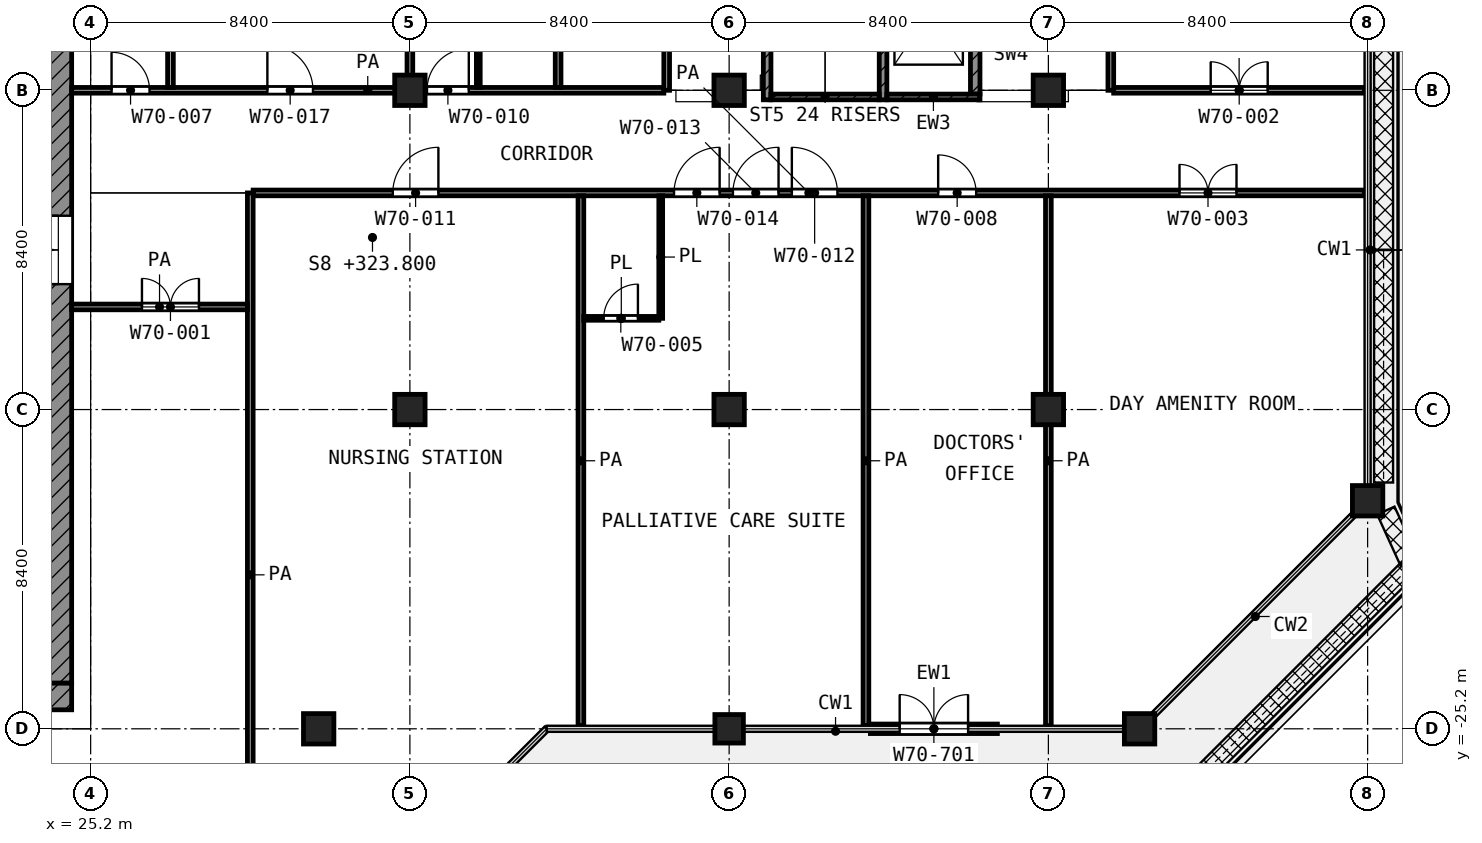
"""IFC4 building model, lengths in metres.
Left out: names, types, materials, properties, quantities, classifications, styles, units other than length and angle.
Written with IfcOpenShell. Run it as: python <this file> out.ifc"""

import sys

from ifc_helpers import new_model, si_unit, direction, frame, frame_2d, origin, origin_2d, place, context, subcontext, project, spatial, rectangle, extrude, element, fill, save


model = new_model("IFC4")
c1 = context("Model", 3, precision=1e-05, world=origin(), true_north=direction((0.0, 1.0)))
c2 = subcontext(c1, "Body", "Model", "MODEL_VIEW")
j1 = project(units=[si_unit("LENGTHUNIT", "METRE"), si_unit("PLANEANGLEUNIT", "RADIAN")], contexts=[c1])
p1 = place(None, origin())
s1 = spatial("IfcSite", under=j1, at=p1, CompositionType="ELEMENT")
p2 = place(p1, origin())
s2 = spatial("IfcBuilding", under=s1, at=p2, CompositionType="ELEMENT")
p3 = place(p2, frame((0.0, 0.0, 323.8)))
s3 = spatial("IfcBuildingStorey", under=s2, at=p3, CompositionType="ELEMENT", Elevation=323.8)
for number, where, z_axis, x_axis in (
    (1, (33.6, -8.4, 0.0), (0.0, 0.0, 1.0), (1.0, 0.0, 0.0)),
    (2, (42.0, -8.4, 0.0), (0.0, 0.0, 1.0), (1.0, 0.0, 0.0)),
    (3, (50.4, -8.4, 0.0), (0.0, 0.0, 1.0), (1.0, 0.0, 0.0)),
    (4, (33.6, -16.8, 0.0), (0.0, 0.0, 1.0), (1.0, 0.0, 0.0)),
    (5, (42.0, -16.8, 0.0), (0.0, 0.0, 1.0), (1.0, 0.0, 0.0)),
    (6, (50.4, -16.8, 0.0), (0.0, 0.0, 1.0), (1.0, 0.0, 0.0)),
    (7, (58.8, -19.2, 0.0), (0.0, 0.0, 1.0), (1.0, 0.0, 0.0)),
    (8, (31.2, -25.2, 0.0), (0.0, 0.0, 1.0), (1.0, 0.0, 0.0)),
):
    element("IfcColumn", number, at=place(p3, frame(where, z_axis=z_axis, x_axis=x_axis)), inside=s3, PredefinedType="COLUMN", context=c2, shape_type="SweptSolid", body=[
        extrude(rectangle(XDim=0.8, YDim=0.8, at=origin_2d()), origin(), (0.0, 0.0, 1.0), 4.2),
    ])
p4 = place(p3, frame((42.0, -25.2, 0.0), z_axis=(0.0, 0.0, 1.0), x_axis=(1.0, 0.0, 0.0)))
e9 = element("IfcColumn", 9, at=p4, inside=s3, PredefinedType="COLUMN", context=c2, shape_type="SweptSolid", body=[
    extrude(rectangle(XDim=0.75, YDim=0.75, at=origin_2d()), origin(), (0.0, 0.0, 1.0), 4.2),
])
p5 = place(p3, frame((52.8, -25.2, 0.0), z_axis=(0.0, 0.0, 1.0), x_axis=(1.0, 0.0, 0.0)))
e10 = element("IfcColumn", 10, at=p5, inside=s3, PredefinedType="COLUMN", context=c2, shape_type="SweptSolid", body=[
    extrude(rectangle(XDim=0.8, YDim=0.8, at=origin_2d()), origin(), (0.0, 0.0, 1.0), 4.2),
])
p6 = place(p3, frame((45.717, -25.2, 0.0), z_axis=(0.0, 0.0, 1.0), x_axis=(1.0, 0.0, 0.0)))
e11 = element("IfcWall", 11, at=p6, inside=s3, PredefinedType="SOLIDWALL", context=c2, shape_type="SweptSolid", body=[
    extrude(rectangle(XDim=3.342, YDim=0.25, at=frame_2d((1.671, 0.0))), origin(), (0.0, 0.0, 1.0), 3.48),
])
p7 = place(p6, frame((0.771, 0.0, 0.0)))
e12 = element("IfcOpeningElement", 12, at=p7, cuts=e11, PredefinedType="OPENING", context=c2, shape_type="SweptSolid", body=[
    extrude(rectangle(XDim=1.8, YDim=2.1, at=frame_2d((0.9, 1.05))), frame((0.0, 0.135, 0.0), z_axis=(0.0, -1.0, 0.0), x_axis=(1.0, 0.0, 0.0)), (0.0, 0.0, 1.0), 0.27),
])
p8 = place(p3, frame((24.35, -24.0, 0.0), z_axis=(0.0, 0.0, 1.0), x_axis=(0.0, 1.0, 0.0)))
e13 = element("IfcWall", 13, at=p8, inside=s3, PredefinedType="SHEAR", context=c2, shape_type="SweptSolid", body=[
    extrude(rectangle(XDim=18.6, YDim=0.7, at=frame_2d((9.3, 0.0))), origin(), (0.0, 0.0, 1.0), 3.6),
])
p9 = place(p8, frame((10.5, 0.0, 0.0)))
e14 = element("IfcOpeningElement", 14, at=p9, cuts=e13, PredefinedType="OPENING", context=c2, shape_type="SweptSolid", body=[
    extrude(rectangle(XDim=1.8, YDim=2.1, at=frame_2d((0.9, 1.05))), frame((0.0, 0.36, 0.0), z_axis=(0.0, -1.0, 0.0), x_axis=(1.0, 0.0, 0.0)), (0.0, 0.0, 1.0), 0.72),
])
p10 = place(p3, frame((24.35, -24.7, 0.0), z_axis=(0.0, 0.0, 1.0), x_axis=(0.0, 1.0, 0.0)))
e15 = element("IfcWall", 15, at=p10, inside=s3, PredefinedType="SHEAR", context=c2, shape_type="SweptSolid", body=[
    extrude(rectangle(XDim=0.7, YDim=0.7, at=frame_2d((0.35, 0.0))), origin(), (0.0, 0.0, 1.0), 3.6),
])
p11 = place(p3, frame((43.0, -8.65, 0.0), z_axis=(0.0, 0.0, 1.0), x_axis=(0.0, 1.0, 0.0)))
e16 = element("IfcWall", 16, at=p11, inside=s3, PredefinedType="SHEAR", context=c2, shape_type="SweptSolid", body=[
    extrude(rectangle(XDim=8.35, YDim=0.2, at=frame_2d((4.175, 0.0))), origin(), (0.0, 0.0, 1.0), 3.6),
])
p12 = place(p11, frame((7.0, 0.0, 0.0)))
e17 = element("IfcOpeningElement", 17, at=p12, cuts=e16, PredefinedType="OPENING", context=c2, shape_type="SweptSolid", body=[
    extrude(rectangle(XDim=1.1, YDim=2.1, at=frame_2d((0.55, 1.05))), frame((0.0, 0.11, 0.0), z_axis=(0.0, -1.0, 0.0), x_axis=(1.0, 0.0, 0.0)), (0.0, 0.0, 1.0), 0.22),
])
p13 = place(p3, frame((46.05, -8.65, 0.0), z_axis=(0.0, 0.0, 1.0), x_axis=(0.0, 1.0, 0.0)))
e18 = element("IfcWall", 18, at=p13, inside=s3, PredefinedType="SHEAR", context=c2, shape_type="SweptSolid", body=[
    extrude(rectangle(XDim=8.35, YDim=0.2, at=frame_2d((4.175, 0.0))), origin(), (0.0, 0.0, 1.0), 3.6),
])
p14 = place(p13, frame((7.0, 0.0, 0.0)))
e19 = element("IfcOpeningElement", 19, at=p14, cuts=e18, PredefinedType="OPENING", context=c2, shape_type="SweptSolid", body=[
    extrude(rectangle(XDim=1.1, YDim=2.1, at=frame_2d((0.55, 1.05))), frame((0.0, 0.11, 0.0), z_axis=(0.0, -1.0, 0.0), x_axis=(1.0, 0.0, 0.0)), (0.0, 0.0, 1.0), 0.22),
])
p15 = place(p3, frame((43.1, -8.575, 0.0), z_axis=(0.0, 0.0, 1.0), x_axis=(1.0, 0.0, 0.0)))
e20 = element("IfcWall", 20, at=p15, inside=s3, PredefinedType="SHEAR", context=c2, shape_type="SweptSolid", body=[
    extrude(rectangle(XDim=2.85, YDim=0.15, at=frame_2d((1.425, 0.0))), origin(), (0.0, 0.0, 1.0), 3.6),
])
p16 = place(p3, frame((46.15, -8.575, 0.0), z_axis=(0.0, 0.0, 1.0), x_axis=(1.0, 0.0, 0.0)))
e21 = element("IfcWall", 21, at=p16, inside=s3, PredefinedType="SHEAR", context=c2, shape_type="SweptSolid", body=[
    extrude(rectangle(XDim=2.45, YDim=0.15, at=frame_2d((1.225, 0.0))), origin(), (0.0, 0.0, 1.0), 3.6),
])
p17 = place(p3, frame((48.475, -8.5, 0.0), z_axis=(0.0, 0.0, 1.0), x_axis=(0.0, 1.0, 0.0)))
e22 = element("IfcWall", 22, at=p17, inside=s3, PredefinedType="SHEAR", context=c2, shape_type="SweptSolid", body=[
    extrude(rectangle(XDim=3.475, YDim=0.25, at=frame_2d((1.738, 0.0))), origin(), (0.0, 0.0, 1.0), 3.6),
])
p18 = place(p3, frame((38.175, -14.4, 0.0), z_axis=(0.0, 0.0, 1.0), x_axis=(1.0, 0.0, 0.0)))
e23 = element("IfcWall", 23, at=p18, inside=s3, PredefinedType="PARTITIONING", context=c2, shape_type="SweptSolid", body=[
    extrude(rectangle(XDim=1.975, YDim=0.1, at=frame_2d((0.987, 0.0))), origin(), (0.0, 0.0, 1.0), 3.6),
])
p19 = place(p18, frame((0.525, 0.0, 0.0)))
e24 = element("IfcOpeningElement", 24, at=p19, cuts=e23, PredefinedType="OPENING", context=c2, shape_type="SweptSolid", body=[
    extrude(rectangle(XDim=0.9, YDim=2.1, at=frame_2d((0.45, 1.05))), frame((0.0, 0.06, 0.0), z_axis=(0.0, -1.0, 0.0), x_axis=(1.0, 0.0, 0.0)), (0.0, 0.0, 1.0), 0.12),
])
for number, where, z_axis, x_axis in (
    (25, (35.4, -8.325, 0.0), (0.0, 0.0, 1.0), (0.0, 1.0, 0.0)),
    (26, (40.2, -14.4, 0.0), (0.0, 0.0, 1.0), (0.0, 1.0, 0.0)),
):
    element("IfcWall", number, at=place(p3, frame(where, z_axis=z_axis, x_axis=x_axis)), inside=s3, PredefinedType="PARTITIONING", context=c2, shape_type="SweptSolid", body=[
        extrude(rectangle(XDim=3.225, YDim=0.1, at=frame_2d((1.612, 0.0))), origin(), (0.0, 0.0, 1.0), 3.6),
    ])
p20 = place(p3, frame((24.7, -14.1, 0.0), z_axis=(0.0, 0.0, 1.0), x_axis=(1.0, 0.0, 0.0)))
e27 = element("IfcWall", 27, at=p20, inside=s3, PredefinedType="PARTITIONING", context=c2, shape_type="SweptSolid", body=[
    extrude(rectangle(XDim=4.625, YDim=0.15, at=frame_2d((2.312, 0.0))), origin(), (0.0, 0.0, 1.0), 3.6),
])
p21 = place(p20, frame((1.85, 0.0, 0.0)))
e28 = element("IfcOpeningElement", 28, at=p21, cuts=e27, PredefinedType="OPENING", context=c2, shape_type="SweptSolid", body=[
    extrude(rectangle(XDim=1.5, YDim=2.1, at=frame_2d((0.75, 1.05))), frame((0.0, 0.085, 0.0), z_axis=(0.0, -1.0, 0.0), x_axis=(1.0, 0.0, 0.0)), (0.0, 0.0, 1.0), 0.17),
])
p22 = place(p3, frame((29.475, -11.1, 0.0), z_axis=(0.0, 0.0, 1.0), x_axis=(1.0, 0.0, 0.0)))
e29 = element("IfcWall", 29, at=p22, inside=s3, PredefinedType="PARTITIONING", context=c2, shape_type="SweptSolid", body=[
    extrude(rectangle(XDim=29.245, YDim=0.15, at=frame_2d((14.623, 0.0))), origin(), (0.0, 0.0, 1.0), 3.6),
])
p23 = place(p22, frame((3.675, 0.0, 0.0)))
e30 = element("IfcOpeningElement", 30, at=p23, cuts=e29, PredefinedType="OPENING", context=c2, shape_type="SweptSolid", body=[
    extrude(rectangle(XDim=1.2, YDim=2.1, at=frame_2d((0.6, 1.05))), frame((0.0, 0.085, 0.0), z_axis=(0.0, -1.0, 0.0), x_axis=(1.0, 0.0, 0.0)), (0.0, 0.0, 1.0), 0.17),
])
p24 = place(p22, frame((14.175, 0.0, 0.0)))
e31 = element("IfcOpeningElement", 31, at=p24, cuts=e29, PredefinedType="OPENING", context=c2, shape_type="SweptSolid", body=[
    extrude(rectangle(XDim=1.2, YDim=2.1, at=frame_2d((0.6, 1.05))), frame((0.0, 0.085, 0.0), z_axis=(0.0, -1.0, 0.0), x_axis=(1.0, 0.0, 0.0)), (0.0, 0.0, 1.0), 0.17),
])
p25 = place(p22, frame((12.625, 0.0, 0.0)))
e32 = element("IfcOpeningElement", 32, at=p25, cuts=e29, PredefinedType="OPENING", context=c2, shape_type="SweptSolid", body=[
    extrude(rectangle(XDim=1.2, YDim=2.1, at=frame_2d((0.6, 1.05))), frame((0.0, 0.085, 0.0), z_axis=(0.0, -1.0, 0.0), x_axis=(1.0, 0.0, 0.0)), (0.0, 0.0, 1.0), 0.17),
])
p26 = place(p22, frame((11.075, 0.0, 0.0)))
e33 = element("IfcOpeningElement", 33, at=p26, cuts=e29, PredefinedType="OPENING", context=c2, shape_type="SweptSolid", body=[
    extrude(rectangle(XDim=1.2, YDim=2.1, at=frame_2d((0.6, 1.05))), frame((0.0, 0.085, 0.0), z_axis=(0.0, -1.0, 0.0), x_axis=(1.0, 0.0, 0.0)), (0.0, 0.0, 1.0), 0.17),
])
p27 = place(p22, frame((18.025, 0.0, 0.0)))
e34 = element("IfcOpeningElement", 34, at=p27, cuts=e29, PredefinedType="OPENING", context=c2, shape_type="SweptSolid", body=[
    extrude(rectangle(XDim=1.0, YDim=2.1, at=frame_2d((0.5, 1.05))), frame((0.0, 0.085, 0.0), z_axis=(0.0, -1.0, 0.0), x_axis=(1.0, 0.0, 0.0)), (0.0, 0.0, 1.0), 0.17),
])
p28 = place(p22, frame((24.375, 0.0, 0.0)))
e35 = element("IfcOpeningElement", 35, at=p28, cuts=e29, PredefinedType="OPENING", context=c2, shape_type="SweptSolid", body=[
    extrude(rectangle(XDim=1.5, YDim=2.1, at=frame_2d((0.75, 1.05))), frame((0.0, 0.085, 0.0), z_axis=(0.0, -1.0, 0.0), x_axis=(1.0, 0.0, 0.0)), (0.0, 0.0, 1.0), 0.17),
])
p29 = place(p3, frame((24.7, -8.4, 0.0), z_axis=(0.0, 0.0, 1.0), x_axis=(1.0, 0.0, 0.0)))
e36 = element("IfcWall", 36, at=p29, inside=s3, PredefinedType="PARTITIONING", context=c2, shape_type="SweptSolid", body=[
    extrude(rectangle(XDim=15.582, YDim=0.15, at=frame_2d((7.791, 0.0))), origin(), (0.0, 0.0, 1.0), 3.6),
])
p30 = place(p29, frame((9.35, 0.0, 0.0)))
e37 = element("IfcOpeningElement", 37, at=p30, cuts=e36, PredefinedType="OPENING", context=c2, shape_type="SweptSolid", body=[
    extrude(rectangle(XDim=1.1, YDim=2.1, at=frame_2d((0.55, 1.05))), frame((0.0, 0.085, 0.0), z_axis=(0.0, -1.0, 0.0), x_axis=(1.0, 0.0, 0.0)), (0.0, 0.0, 1.0), 0.17),
])
p31 = place(p29, frame((1.05, 0.0, 0.0)))
e38 = element("IfcOpeningElement", 38, at=p31, cuts=e36, PredefinedType="OPENING", context=c2, shape_type="SweptSolid", body=[
    extrude(rectangle(XDim=1.0, YDim=2.1, at=frame_2d((0.5, 1.05))), frame((0.0, 0.085, 0.0), z_axis=(0.0, -1.0, 0.0), x_axis=(1.0, 0.0, 0.0)), (0.0, 0.0, 1.0), 0.17),
])
p32 = place(p29, frame((5.15, 0.0, 0.0)))
e39 = element("IfcOpeningElement", 39, at=p32, cuts=e36, PredefinedType="OPENING", context=c2, shape_type="SweptSolid", body=[
    extrude(rectangle(XDim=1.2, YDim=2.1, at=frame_2d((0.6, 1.05))), frame((0.0, 0.085, 0.0), z_axis=(0.0, -1.0, 0.0), x_axis=(1.0, 0.0, 0.0)), (0.0, 0.0, 1.0), 0.17),
])
p33 = place(p3, frame((52.118, -8.4, 0.0), z_axis=(0.0, 0.0, 1.0), x_axis=(1.0, 0.0, 0.0)))
e40 = element("IfcWall", 40, at=p33, inside=s3, PredefinedType="PARTITIONING", context=c2, shape_type="SweptSolid", body=[
    extrude(rectangle(XDim=6.602, YDim=0.15, at=frame_2d((3.301, 0.0))), origin(), (0.0, 0.0, 1.0), 3.6),
])
p34 = place(p33, frame((2.553, 0.0, 0.0)))
e41 = element("IfcOpeningElement", 41, at=p34, cuts=e40, PredefinedType="OPENING", context=c2, shape_type="SweptSolid", body=[
    extrude(rectangle(XDim=1.5, YDim=2.1, at=frame_2d((0.75, 1.05))), frame((0.0, 0.085, 0.0), z_axis=(0.0, -1.0, 0.0), x_axis=(1.0, 0.0, 0.0)), (0.0, 0.0, 1.0), 0.17),
])
p35 = place(p3, frame((27.3, -8.325, 0.0), z_axis=(0.0, 0.0, 1.0), x_axis=(0.0, 1.0, 0.0)))
e42 = element("IfcWall", 42, at=p35, inside=s3, PredefinedType="PARTITIONING", context=c2, shape_type="SweptSolid", body=[
    extrude(rectangle(XDim=8.245, YDim=0.15, at=frame_2d((4.123, 0.0))), origin(), (0.0, 0.0, 1.0), 3.6),
])
p36 = place(p3, frame((29.4, -31.198, 0.0), z_axis=(0.0, 0.0, 1.0), x_axis=(0.0, 1.0, 0.0)))
e43 = element("IfcWall", 43, at=p36, inside=s3, PredefinedType="PARTITIONING", context=c2, shape_type="SweptSolid", body=[
    extrude(rectangle(XDim=20.098, YDim=0.15, at=frame_2d((10.049, 0.0))), origin(), (0.0, 0.0, 1.0), 3.6),
])
for number, where, z_axis, x_axis in (
    (44, (33.6, -8.325, 0.0), (0.0, 0.0, 1.0), (0.0, 1.0, 0.0)),
    (45, (37.5, -8.325, 0.0), (0.0, 0.0, 1.0), (0.0, 1.0, 0.0)),
):
    element("IfcWall", number, at=place(p3, frame(where, z_axis=z_axis, x_axis=x_axis)), inside=s3, PredefinedType="PARTITIONING", context=c2, shape_type="SweptSolid", body=[
        extrude(rectangle(XDim=8.245, YDim=0.15, at=frame_2d((4.123, 0.0))), origin(), (0.0, 0.0, 1.0), 3.6),
    ])
p37 = place(p3, frame((38.1, -25.12, 0.0), z_axis=(0.0, 0.0, 1.0), x_axis=(0.0, 1.0, 0.0)))
e46 = element("IfcWall", 46, at=p37, inside=s3, PredefinedType="PARTITIONING", context=c2, shape_type="SweptSolid", body=[
    extrude(rectangle(XDim=13.945, YDim=0.15, at=frame_2d((6.973, 0.0))), origin(), (0.0, 0.0, 1.0), 3.6),
])
p38 = place(p3, frame((40.357, -8.4, 0.0), z_axis=(0.0, 0.0, 1.0), x_axis=(0.0, 1.0, 0.0)))
e47 = element("IfcWall", 47, at=p38, inside=s3, PredefinedType="PARTITIONING", context=c2, shape_type="SweptSolid", body=[
    extrude(rectangle(XDim=8.048, YDim=0.15, at=frame_2d((4.024, 0.0))), origin(), (0.0, 0.0, 1.0), 3.6),
])
p39 = place(p38, frame((3.574, 0.0, 0.0)))
e48 = element("IfcOpeningElement", 48, at=p39, cuts=e47, PredefinedType="OPENING", context=c2, shape_type="SweptSolid", body=[
    extrude(rectangle(XDim=0.9, YDim=2.1, at=frame_2d((0.45, 1.05))), frame((0.0, 0.085, 0.0), z_axis=(0.0, -1.0, 0.0), x_axis=(1.0, 0.0, 0.0)), (0.0, 0.0, 1.0), 0.17),
])
for number, where, z_axis, x_axis in (
    (49, (45.6, -25.12, 0.0), (0.0, 0.0, 1.0), (0.0, 1.0, 0.0)),
    (50, (50.4, -25.12, 0.0), (0.0, 0.0, 1.0), (0.0, 1.0, 0.0)),
):
    element("IfcWall", number, at=place(p3, frame(where, z_axis=z_axis, x_axis=x_axis)), inside=s3, PredefinedType="PARTITIONING", context=c2, shape_type="SweptSolid", body=[
        extrude(rectangle(XDim=13.945, YDim=0.15, at=frame_2d((6.973, 0.0))), origin(), (0.0, 0.0, 1.0), 3.6),
    ])
p40 = place(p3, frame((52.043, -8.4, 0.0), z_axis=(0.0, 0.0, 1.0), x_axis=(0.0, 1.0, 0.0)))
e51 = element("IfcWall", 51, at=p40, inside=s3, PredefinedType="PARTITIONING", context=c2, shape_type="SweptSolid", body=[
    extrude(rectangle(XDim=6.548, YDim=0.15, at=frame_2d((3.274, 0.0))), origin(), (0.0, 0.0, 1.0), 3.6),
])
p41 = place(p7, origin())
e52 = element("IfcDoor", 52, at=p41, inside=s3, OperationType="DOUBLE_DOOR_SINGLE_SWING", PredefinedType="DOOR", context=c2, shape_type="SweptSolid", body=[
    extrude(rectangle(XDim=1.8, YDim=2.1, at=frame_2d((0.9, 1.05))), frame((0.0, 0.025, 0.0), z_axis=(0.0, -1.0, 0.0), x_axis=(1.0, 0.0, 0.0)), (0.0, 0.0, 1.0), 0.05),
])
fill(e12, e52)
p42 = place(p9, origin())
e53 = element("IfcDoor", 53, at=p42, inside=s3, OperationType="DOUBLE_DOOR_SINGLE_SWING", PredefinedType="DOOR", context=c2, shape_type="SweptSolid", body=[
    extrude(rectangle(XDim=1.8, YDim=2.1, at=frame_2d((0.9, 1.05))), frame((0.0, 0.025, 0.0), z_axis=(0.0, -1.0, 0.0), x_axis=(1.0, 0.0, 0.0)), (0.0, 0.0, 1.0), 0.05),
])
fill(e14, e53)
p43 = place(p21, origin())
e54 = element("IfcDoor", 54, at=p43, inside=s3, OperationType="DOUBLE_DOOR_SINGLE_SWING", PredefinedType="DOOR", context=c2, shape_type="SweptSolid", body=[
    extrude(rectangle(XDim=1.5, YDim=2.1, at=frame_2d((0.75, 1.05))), frame((0.0, 0.025, 0.0), z_axis=(0.0, -1.0, 0.0), x_axis=(1.0, 0.0, 0.0)), (0.0, 0.0, 1.0), 0.05),
])
fill(e28, e54)
p44 = place(p30, origin())
e55 = element("IfcDoor", 55, at=p44, inside=s3, OperationType="SINGLE_SWING_RIGHT", PredefinedType="DOOR", context=c2, shape_type="SweptSolid", body=[
    extrude(rectangle(XDim=1.1, YDim=2.1, at=frame_2d((0.55, 1.05))), frame((0.0, 0.025, 0.0), z_axis=(0.0, -1.0, 0.0), x_axis=(1.0, 0.0, 0.0)), (0.0, 0.0, 1.0), 0.05),
])
fill(e37, e55)
p45 = place(p34, origin())
e56 = element("IfcDoor", 56, at=p45, inside=s3, OperationType="DOUBLE_DOOR_SINGLE_SWING", PredefinedType="DOOR", context=c2, shape_type="SweptSolid", body=[
    extrude(rectangle(XDim=1.5, YDim=2.1, at=frame_2d((0.75, 1.05))), frame((0.0, 0.025, 0.0), z_axis=(0.0, -1.0, 0.0), x_axis=(1.0, 0.0, 0.0)), (0.0, 0.0, 1.0), 0.05),
])
fill(e41, e56)
p46 = place(p23, origin())
e57 = element("IfcDoor", 57, at=p46, inside=s3, OperationType="SINGLE_SWING_RIGHT", PredefinedType="DOOR", context=c2, shape_type="SweptSolid", body=[
    extrude(rectangle(XDim=1.2, YDim=2.1, at=frame_2d((0.6, 1.05))), frame((0.0, 0.025, 0.0), z_axis=(0.0, -1.0, 0.0), x_axis=(1.0, 0.0, 0.0)), (0.0, 0.0, 1.0), 0.05),
])
fill(e30, e57)
p47 = place(p24, origin())
e58 = element("IfcDoor", 58, at=p47, inside=s3, OperationType="SINGLE_SWING_LEFT", PredefinedType="DOOR", context=c2, shape_type="SweptSolid", body=[
    extrude(rectangle(XDim=1.2, YDim=2.1, at=frame_2d((0.6, 1.05))), frame((0.0, 0.025, 0.0), z_axis=(0.0, -1.0, 0.0), x_axis=(1.0, 0.0, 0.0)), (0.0, 0.0, 1.0), 0.05),
])
fill(e31, e58)
p48 = place(p25, origin())
e59 = element("IfcDoor", 59, at=p48, inside=s3, OperationType="SINGLE_SWING_RIGHT", PredefinedType="DOOR", context=c2, shape_type="SweptSolid", body=[
    extrude(rectangle(XDim=1.2, YDim=2.1, at=frame_2d((0.6, 1.05))), frame((0.0, 0.025, 0.0), z_axis=(0.0, -1.0, 0.0), x_axis=(1.0, 0.0, 0.0)), (0.0, 0.0, 1.0), 0.05),
])
fill(e32, e59)
p49 = place(p26, origin())
e60 = element("IfcDoor", 60, at=p49, inside=s3, OperationType="SINGLE_SWING_RIGHT", PredefinedType="DOOR", context=c2, shape_type="SweptSolid", body=[
    extrude(rectangle(XDim=1.2, YDim=2.1, at=frame_2d((0.6, 1.05))), frame((0.0, 0.025, 0.0), z_axis=(0.0, -1.0, 0.0), x_axis=(1.0, 0.0, 0.0)), (0.0, 0.0, 1.0), 0.05),
])
fill(e33, e60)
p50 = place(p19, origin())
e61 = element("IfcDoor", 61, at=p50, inside=s3, OperationType="SINGLE_SWING_RIGHT", PredefinedType="DOOR", context=c2, shape_type="SweptSolid", body=[
    extrude(rectangle(XDim=0.9, YDim=2.1, at=frame_2d((0.45, 1.05))), frame((0.0, 0.025, 0.0), z_axis=(0.0, -1.0, 0.0), x_axis=(1.0, 0.0, 0.0)), (0.0, 0.0, 1.0), 0.05),
])
fill(e24, e61)
p51 = place(p27, origin())
e62 = element("IfcDoor", 62, at=p51, inside=s3, OperationType="SINGLE_SWING_LEFT", PredefinedType="DOOR", context=c2, shape_type="SweptSolid", body=[
    extrude(rectangle(XDim=1.0, YDim=2.1, at=frame_2d((0.5, 1.05))), frame((0.0, 0.025, 0.0), z_axis=(0.0, -1.0, 0.0), x_axis=(1.0, 0.0, 0.0)), (0.0, 0.0, 1.0), 0.05),
])
fill(e34, e62)
p52 = place(p28, origin())
e63 = element("IfcDoor", 63, at=p52, inside=s3, OperationType="DOUBLE_DOOR_SINGLE_SWING", PredefinedType="DOOR", context=c2, shape_type="SweptSolid", body=[
    extrude(rectangle(XDim=1.5, YDim=2.1, at=frame_2d((0.75, 1.05))), frame((0.0, 0.025, 0.0), z_axis=(0.0, -1.0, 0.0), x_axis=(1.0, 0.0, 0.0)), (0.0, 0.0, 1.0), 0.05),
])
fill(e35, e63)
p53 = place(p31, origin())
e64 = element("IfcDoor", 64, at=p53, inside=s3, OperationType="SINGLE_SWING_LEFT", PredefinedType="DOOR", context=c2, shape_type="SweptSolid", body=[
    extrude(rectangle(XDim=1.0, YDim=2.1, at=frame_2d((0.5, 1.05))), frame((0.0, 0.025, 0.0), z_axis=(0.0, -1.0, 0.0), x_axis=(1.0, 0.0, 0.0)), (0.0, 0.0, 1.0), 0.05),
])
fill(e38, e64)
p54 = place(p32, origin())
e65 = element("IfcDoor", 65, at=p54, inside=s3, OperationType="SINGLE_SWING_LEFT", PredefinedType="DOOR", context=c2, shape_type="SweptSolid", body=[
    extrude(rectangle(XDim=1.2, YDim=2.1, at=frame_2d((0.6, 1.05))), frame((0.0, 0.025, 0.0), z_axis=(0.0, -1.0, 0.0), x_axis=(1.0, 0.0, 0.0)), (0.0, 0.0, 1.0), 0.05),
])
fill(e39, e65)
save(model, sys.argv[1])
